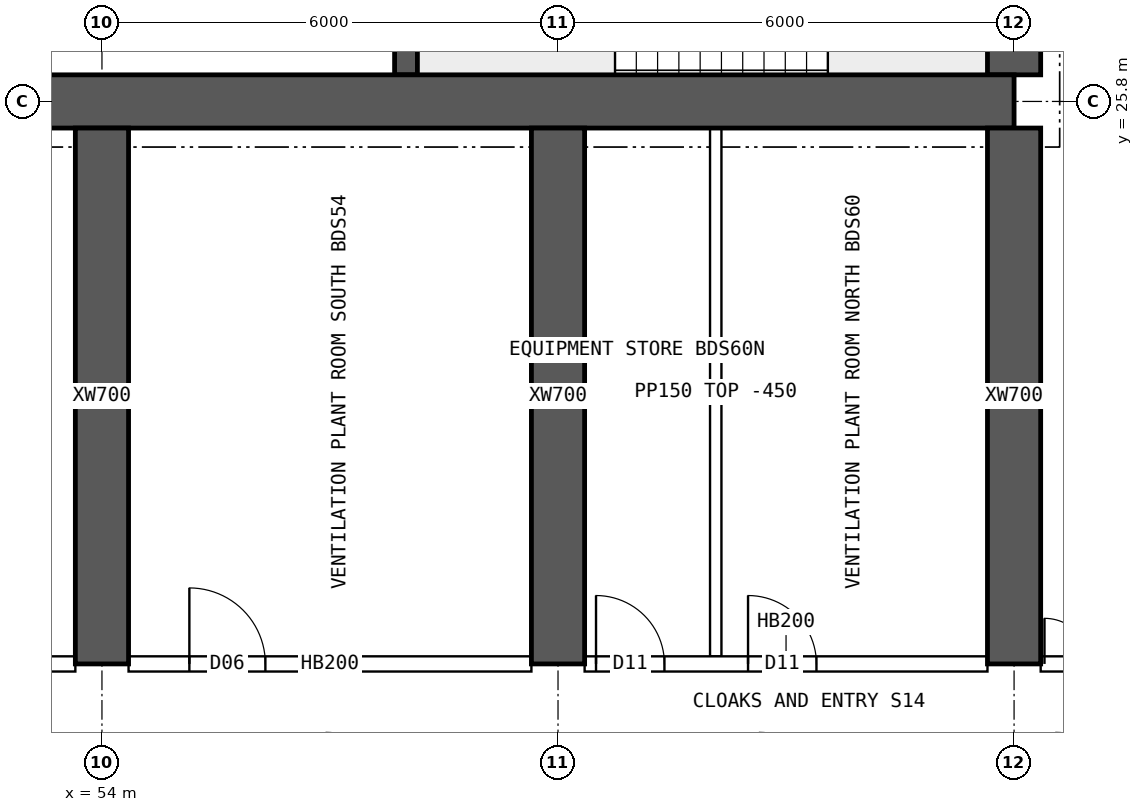
"""IFC4 building model, lengths in metres.
Left out: names, types, materials, properties, quantities, classifications, styles, units other than length and angle.
Written with IfcOpenShell. Run it as: python <this file> out.ifc"""

import sys

from ifc_helpers import new_model, si_unit, direction, frame, frame_2d, origin, place, context, subcontext, project, spatial, rectangle, extrude, element, fill, save


model = new_model("IFC4")
c1 = context("Model", 3, precision=1e-05, world=origin(), true_north=direction((0.0, 1.0)))
c2 = subcontext(c1, "Body", "Model", "MODEL_VIEW")
j1 = project(units=[si_unit("LENGTHUNIT", "METRE"), si_unit("PLANEANGLEUNIT", "RADIAN")], contexts=[c1])
p1 = place(None, origin())
s1 = spatial("IfcSite", under=j1, at=p1, CompositionType="ELEMENT")
p2 = place(p1, origin())
s2 = spatial("IfcBuilding", under=s1, at=p2, CompositionType="ELEMENT")
p3 = place(p2, frame((0.0, 0.0, 227.8)))
s3 = spatial("IfcBuildingStorey", under=s2, at=p3, CompositionType="ELEMENT", Elevation=227.8)
p4 = place(p3, frame((18.0, 25.8, 0.0), z_axis=(0.0, 0.0, 1.0), x_axis=(1.0, 0.0, 0.0)))
e1 = element("IfcWall", 1, at=p4, inside=s3, PredefinedType="SHEAR", context=c2, shape_type="SweptSolid", body=[
    extrude(rectangle(XDim=48.0, YDim=0.7, at=frame_2d((24.0, 0.0))), origin(), (0.0, 0.0, 1.0), 3.75),
])
p5 = place(p3, frame((66.0, 26.15, 0.0), z_axis=(0.0, 0.0, 1.0), x_axis=(0.0, 1.0, 0.0)))
e2 = element("IfcWall", 2, at=p5, inside=s3, PredefinedType="SHEAR", context=c2, shape_type="SweptSolid", body=[
    extrude(rectangle(XDim=11.7, YDim=0.7, at=frame_2d((5.85, 0.0))), origin(), (0.0, 0.0, 1.0), 3.75),
])
p6 = place(p5, frame((5.15, 0.0, 0.0)))
e3 = element("IfcOpeningElement", 3, at=p6, cuts=e2, PredefinedType="OPENING", context=c2, shape_type="SweptSolid", body=[
    extrude(rectangle(XDim=1.2, YDim=2.1, at=frame_2d((0.6, 1.05))), frame((0.0, 0.36, 0.0), z_axis=(0.0, -1.0, 0.0), x_axis=(1.0, 0.0, 0.0)), (0.0, 0.0, 1.0), 0.72),
])
p7 = place(p3, frame((58.0, 26.15, 0.0), z_axis=(0.0, 0.0, 1.0), x_axis=(0.0, 1.0, 0.0)))
e4 = element("IfcWall", 4, at=p7, inside=s3, PredefinedType="SHEAR", context=c2, shape_type="SweptSolid", body=[
    extrude(rectangle(XDim=4.1, YDim=0.3, at=frame_2d((2.05, 0.0))), origin(), (0.0, 0.0, 1.0), 3.75),
])
for number, where, z_axis, x_axis in (
    (5, (54.0, 18.4, 0.0), (0.0, 0.0, 1.0), (0.0, 1.0, 0.0)),
    (6, (60.0, 18.4, 0.0), (0.0, 0.0, 1.0), (0.0, 1.0, 0.0)),
    (7, (66.0, 18.4, 0.0), (0.0, 0.0, 1.0), (0.0, 1.0, 0.0)),
):
    element("IfcWall", number, at=place(p3, frame(where, z_axis=z_axis, x_axis=x_axis)), inside=s3, PredefinedType="SHEAR", context=c2, shape_type="SweptSolid", body=[
        extrude(rectangle(XDim=7.05, YDim=0.7, at=frame_2d((3.525, 0.0))), origin(), (0.0, 0.0, 1.0), 3.75),
    ])
p8 = place(p3, frame((48.35, 18.4, 0.0), z_axis=(0.0, 0.0, 1.0), x_axis=(1.0, 0.0, 0.0)))
e8 = element("IfcWall", 8, at=p8, inside=s3, PredefinedType="SOLIDWALL", context=c2, shape_type="SweptSolid", body=[
    extrude(rectangle(XDim=5.3, YDim=0.2, at=frame_2d((2.65, 0.0))), origin(), (0.0, 0.0, 1.0), 3.3),
])
p9 = place(p8, frame((0.15, 0.0, 0.0)))
e9 = element("IfcOpeningElement", 9, at=p9, cuts=e8, PredefinedType="OPENING", context=c2, shape_type="SweptSolid", body=[
    extrude(rectangle(XDim=0.9, YDim=2.1, at=frame_2d((0.45, 1.05))), frame((0.0, 0.11, 0.0), z_axis=(0.0, -1.0, 0.0), x_axis=(1.0, 0.0, 0.0)), (0.0, 0.0, 1.0), 0.22),
])
p10 = place(p8, frame((3.385, 0.0, 0.0)))
e10 = element("IfcOpeningElement", 10, at=p10, cuts=e8, PredefinedType="OPENING", context=c2, shape_type="SweptSolid", body=[
    extrude(rectangle(XDim=0.9, YDim=2.1, at=frame_2d((0.45, 1.05))), frame((0.0, 0.11, 0.0), z_axis=(0.0, -1.0, 0.0), x_axis=(1.0, 0.0, 0.0)), (0.0, 0.0, 1.0), 0.22),
])
p11 = place(p3, frame((54.35, 18.4, 0.0), z_axis=(0.0, 0.0, 1.0), x_axis=(1.0, 0.0, 0.0)))
e11 = element("IfcWall", 11, at=p11, inside=s3, PredefinedType="SOLIDWALL", context=c2, shape_type="SweptSolid", body=[
    extrude(rectangle(XDim=5.3, YDim=0.2, at=frame_2d((2.65, 0.0))), origin(), (0.0, 0.0, 1.0), 3.3),
])
p12 = place(p11, frame((0.8, 0.0, 0.0)))
e12 = element("IfcOpeningElement", 12, at=p12, cuts=e11, PredefinedType="OPENING", context=c2, shape_type="SweptSolid", body=[
    extrude(rectangle(XDim=1.0, YDim=2.1, at=frame_2d((0.5, 1.05))), frame((0.0, 0.11, 0.0), z_axis=(0.0, -1.0, 0.0), x_axis=(1.0, 0.0, 0.0)), (0.0, 0.0, 1.0), 0.22),
])
p13 = place(p3, frame((60.35, 18.4, 0.0), z_axis=(0.0, 0.0, 1.0), x_axis=(1.0, 0.0, 0.0)))
e13 = element("IfcWall", 13, at=p13, inside=s3, PredefinedType="SOLIDWALL", context=c2, shape_type="SweptSolid", body=[
    extrude(rectangle(XDim=5.3, YDim=0.2, at=frame_2d((2.65, 0.0))), origin(), (0.0, 0.0, 1.0), 3.3),
])
p14 = place(p13, frame((0.15, 0.0, 0.0)))
e14 = element("IfcOpeningElement", 14, at=p14, cuts=e13, PredefinedType="OPENING", context=c2, shape_type="SweptSolid", body=[
    extrude(rectangle(XDim=0.9, YDim=2.1, at=frame_2d((0.45, 1.05))), frame((0.0, 0.11, 0.0), z_axis=(0.0, -1.0, 0.0), x_axis=(1.0, 0.0, 0.0)), (0.0, 0.0, 1.0), 0.22),
])
p15 = place(p13, frame((2.15, 0.0, 0.0)))
e15 = element("IfcOpeningElement", 15, at=p15, cuts=e13, PredefinedType="OPENING", context=c2, shape_type="SweptSolid", body=[
    extrude(rectangle(XDim=0.9, YDim=2.1, at=frame_2d((0.45, 1.05))), frame((0.0, 0.11, 0.0), z_axis=(0.0, -1.0, 0.0), x_axis=(1.0, 0.0, 0.0)), (0.0, 0.0, 1.0), 0.22),
])
p16 = place(p3, frame((66.35, 18.4, 0.0), z_axis=(0.0, 0.0, 1.0), x_axis=(1.0, 0.0, 0.0)))
e16 = element("IfcWall", 16, at=p16, inside=s3, PredefinedType="SOLIDWALL", context=c2, shape_type="SweptSolid", body=[
    extrude(rectangle(XDim=2.05, YDim=0.2, at=frame_2d((1.025, 0.0))), origin(), (0.0, 0.0, 1.0), 3.3),
])
p17 = place(p16, frame((0.05, 0.0, 0.0)))
e17 = element("IfcOpeningElement", 17, at=p17, cuts=e16, PredefinedType="OPENING", context=c2, shape_type="SweptSolid", body=[
    extrude(rectangle(XDim=1.2, YDim=2.1, at=frame_2d((0.6, 1.05))), frame((0.0, 0.11, 0.0), z_axis=(0.0, -1.0, 0.0), x_axis=(1.0, 0.0, 0.0)), (0.0, 0.0, 1.0), 0.22),
])
p18 = place(p3, frame((62.075, 18.5, 0.0), z_axis=(0.0, 0.0, 1.0), x_axis=(0.0, 1.0, 0.0)))
e18 = element("IfcWall", 18, at=p18, inside=s3, PredefinedType="PARTITIONING", context=c2, shape_type="SweptSolid", body=[
    extrude(rectangle(XDim=6.95, YDim=0.15, at=frame_2d((3.475, 0.0))), origin(), (0.0, 0.0, 1.0), 3.3),
])
p19 = place(p17, origin())
e19 = element("IfcDoor", 19, at=p19, inside=s3, OperationType="DOUBLE_DOOR_SINGLE_SWING", PredefinedType="DOOR", context=c2, shape_type="SweptSolid", body=[
    extrude(rectangle(XDim=1.2, YDim=2.1, at=frame_2d((0.6, 1.05))), frame((0.0, 0.025, 0.0), z_axis=(0.0, -1.0, 0.0), x_axis=(1.0, 0.0, 0.0)), (0.0, 0.0, 1.0), 0.05),
])
fill(e17, e19)
p20 = place(p12, origin())
e20 = element("IfcDoor", 20, at=p20, inside=s3, OperationType="SINGLE_SWING_LEFT", PredefinedType="DOOR", context=c2, shape_type="SweptSolid", body=[
    extrude(rectangle(XDim=1.0, YDim=2.1, at=frame_2d((0.5, 1.05))), frame((0.0, 0.025, 0.0), z_axis=(0.0, -1.0, 0.0), x_axis=(1.0, 0.0, 0.0)), (0.0, 0.0, 1.0), 0.05),
])
fill(e12, e20)
p21 = place(p14, origin())
e21 = element("IfcDoor", 21, at=p21, inside=s3, OperationType="SINGLE_SWING_LEFT", PredefinedType="DOOR", context=c2, shape_type="SweptSolid", body=[
    extrude(rectangle(XDim=0.9, YDim=2.1, at=frame_2d((0.45, 1.05))), frame((0.0, 0.025, 0.0), z_axis=(0.0, -1.0, 0.0), x_axis=(1.0, 0.0, 0.0)), (0.0, 0.0, 1.0), 0.05),
])
fill(e14, e21)
p22 = place(p15, origin())
e22 = element("IfcDoor", 22, at=p22, inside=s3, OperationType="SINGLE_SWING_LEFT", PredefinedType="DOOR", context=c2, shape_type="SweptSolid", body=[
    extrude(rectangle(XDim=0.9, YDim=2.1, at=frame_2d((0.45, 1.05))), frame((0.0, 0.025, 0.0), z_axis=(0.0, -1.0, 0.0), x_axis=(1.0, 0.0, 0.0)), (0.0, 0.0, 1.0), 0.05),
])
fill(e15, e22)
save(model, sys.argv[1])
